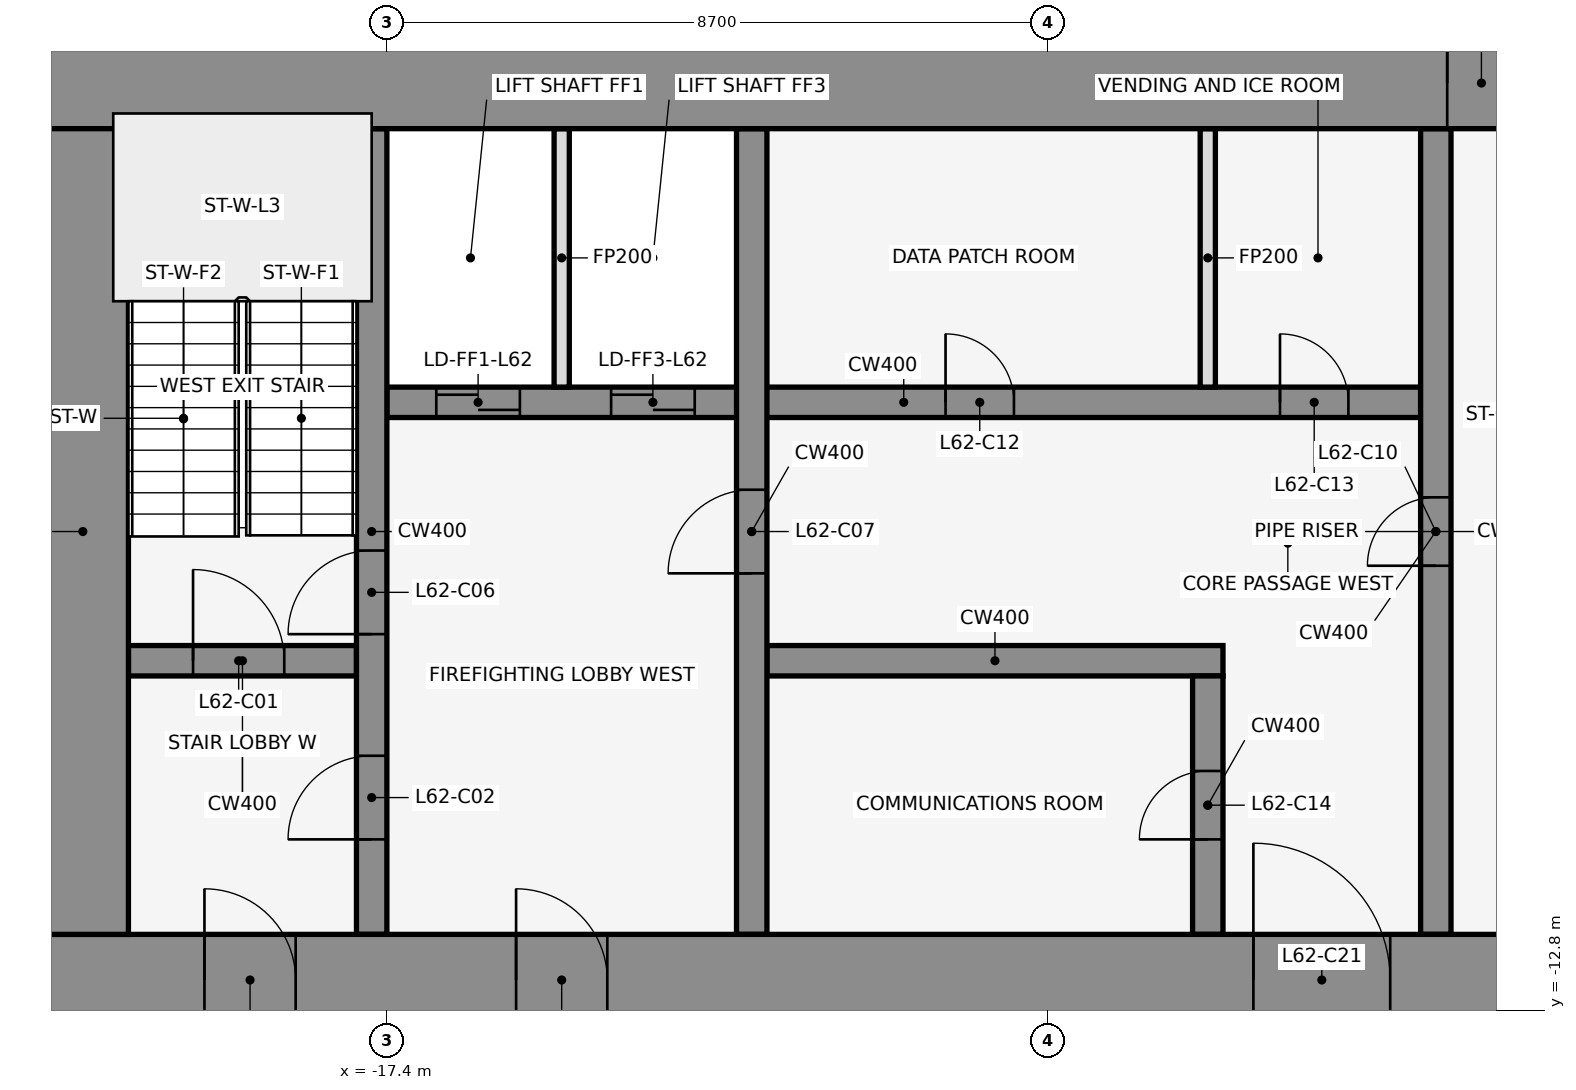
"""IFC4 building model, lengths in metres.
Left out: names, types, materials, properties, quantities, classifications, styles, units other than length and angle.
Written with IfcOpenShell. Run it as: python <this file> out.ifc"""

import sys

from ifc_helpers import new_model, si_unit, direction, frame, frame_2d, origin, place, context, subcontext, project, spatial, rectangle, extrude, element, fill, save


model = new_model("IFC4")
c1 = context("Model", 3, precision=1e-05, world=origin(), true_north=direction((0.0, 1.0)))
c2 = subcontext(c1, "Body", "Model", "MODEL_VIEW")
j1 = project(units=[si_unit("LENGTHUNIT", "METRE"), si_unit("PLANEANGLEUNIT", "RADIAN")], contexts=[c1])
p1 = place(None, origin())
s1 = spatial("IfcSite", under=j1, at=p1, CompositionType="ELEMENT")
p2 = place(p1, origin())
s2 = spatial("IfcBuilding", under=s1, at=p2, CompositionType="ELEMENT")
p3 = place(p2, frame((0.0, 0.0, 275.0)))
s3 = spatial("IfcBuildingStorey", under=s2, at=p3, CompositionType="ELEMENT", Elevation=275.0)
p4 = place(p3, frame((-14.599, 1.08, 0.0), z_axis=(0.0, 0.0, 1.0), x_axis=(-0.83981312244, -0.542875602121, 0.0)))
e1 = element("IfcWall", 1, at=p4, inside=s3, PredefinedType="STANDARD", context=c2, shape_type="SweptSolid", body=[
    extrude(rectangle(XDim=2.183, YDim=0.25, at=frame_2d((1.091, 0.0))), origin(), (0.0, 0.0, 1.0), 4.05),
])
p5 = place(p3, frame((-20.8, -8.2, 0.0), z_axis=(0.0, 0.0, 1.0), x_axis=(1.0, 0.0, 0.0)))
e2 = element("IfcWall", 2, at=p5, inside=s3, PredefinedType="SHEAR", context=c2, shape_type="SweptSolid", body=[
    extrude(rectangle(XDim=3.0, YDim=0.4, at=frame_2d((1.5, 0.0))), origin(), (0.0, 0.0, 1.0), 4.2),
])
p6 = place(p5, frame((0.85, 0.0, 0.0)))
e3 = element("IfcOpeningElement", 3, at=p6, cuts=e2, PredefinedType="OPENING", context=c2, shape_type="SweptSolid", body=[
    extrude(rectangle(XDim=1.2, YDim=2.1, at=frame_2d((0.6, 1.05))), frame((0.0, 0.212, 0.0), z_axis=(0.0, -1.0, 0.0), x_axis=(1.0, 0.0, 0.0)), (0.0, 0.0, 1.0), 0.424),
])
p7 = place(p3, frame((-12.4, -8.2, 0.0), z_axis=(0.0, 0.0, 1.0), x_axis=(1.0, 0.0, 0.0)))
e4 = element("IfcWall", 4, at=p7, inside=s3, PredefinedType="SHEAR", context=c2, shape_type="SweptSolid", body=[
    extrude(rectangle(XDim=6.0, YDim=0.4, at=frame_2d((3.0, 0.0))), origin(), (0.0, 0.0, 1.0), 4.2),
])
p8 = place(p3, frame((-17.4, -4.8, 0.0), z_axis=(0.0, 0.0, 1.0), x_axis=(1.0, 0.0, 0.0)))
e5 = element("IfcWall", 5, at=p8, inside=s3, PredefinedType="SHEAR", context=c2, shape_type="SweptSolid", body=[
    extrude(rectangle(XDim=13.6, YDim=0.4, at=frame_2d((6.8, 0.0))), origin(), (0.0, 0.0, 1.0), 4.2),
])
p9 = place(p8, frame((0.65, 0.0, 0.0)))
e6 = element("IfcOpeningElement", 6, at=p9, cuts=e5, PredefinedType="OPENING", context=c2, shape_type="SweptSolid", body=[
    extrude(rectangle(XDim=1.1, YDim=2.1, at=frame_2d((0.55, 1.05))), frame((0.0, 0.212, 0.0), z_axis=(0.0, -1.0, 0.0), x_axis=(1.0, 0.0, 0.0)), (0.0, 0.0, 1.0), 0.424),
])
p10 = place(p8, frame((2.95, 0.0, 0.0)))
e7 = element("IfcOpeningElement", 7, at=p10, cuts=e5, PredefinedType="OPENING", context=c2, shape_type="SweptSolid", body=[
    extrude(rectangle(XDim=1.1, YDim=2.1, at=frame_2d((0.55, 1.05))), frame((0.0, 0.212, 0.0), z_axis=(0.0, -1.0, 0.0), x_axis=(1.0, 0.0, 0.0)), (0.0, 0.0, 1.0), 0.424),
])
p11 = place(p8, frame((7.35, 0.0, 0.0)))
e8 = element("IfcOpeningElement", 8, at=p11, cuts=e5, PredefinedType="OPENING", context=c2, shape_type="SweptSolid", body=[
    extrude(rectangle(XDim=0.9, YDim=2.1, at=frame_2d((0.45, 1.05))), frame((0.0, 0.212, 0.0), z_axis=(0.0, -1.0, 0.0), x_axis=(1.0, 0.0, 0.0)), (0.0, 0.0, 1.0), 0.424),
])
p12 = place(p8, frame((11.75, 0.0, 0.0)))
e9 = element("IfcOpeningElement", 9, at=p12, cuts=e5, PredefinedType="OPENING", context=c2, shape_type="SweptSolid", body=[
    extrude(rectangle(XDim=0.9, YDim=2.1, at=frame_2d((0.45, 1.05))), frame((0.0, 0.212, 0.0), z_axis=(0.0, -1.0, 0.0), x_axis=(1.0, 0.0, 0.0)), (0.0, 0.0, 1.0), 0.424),
])
p13 = place(p3, frame((-17.6, -11.8, 0.0), z_axis=(0.0, 0.0, 1.0), x_axis=(0.0, 1.0, 0.0)))
e10 = element("IfcWall", 10, at=p13, inside=s3, PredefinedType="SHEAR", context=c2, shape_type="SweptSolid", body=[
    extrude(rectangle(XDim=10.6, YDim=0.4, at=frame_2d((5.3, 0.0))), origin(), (0.0, 0.0, 1.0), 4.2),
])
p14 = place(p13, frame((1.25, 0.0, 0.0)))
e11 = element("IfcOpeningElement", 11, at=p14, cuts=e10, PredefinedType="OPENING", context=c2, shape_type="SweptSolid", body=[
    extrude(rectangle(XDim=1.1, YDim=2.1, at=frame_2d((0.55, 1.05))), frame((0.0, 0.212, 0.0), z_axis=(0.0, -1.0, 0.0), x_axis=(1.0, 0.0, 0.0)), (0.0, 0.0, 1.0), 0.424),
])
p15 = place(p13, frame((3.95, 0.0, 0.0)))
e12 = element("IfcOpeningElement", 12, at=p15, cuts=e10, PredefinedType="OPENING", context=c2, shape_type="SweptSolid", body=[
    extrude(rectangle(XDim=1.1, YDim=2.1, at=frame_2d((0.55, 1.05))), frame((0.0, 0.212, 0.0), z_axis=(0.0, -1.0, 0.0), x_axis=(1.0, 0.0, 0.0)), (0.0, 0.0, 1.0), 0.424),
])
p16 = place(p3, frame((-15.1, -4.6, 0.0), z_axis=(0.0, 0.0, 1.0), x_axis=(0.0, 1.0, 0.0)))
e13 = element("IfcWall", 13, at=p16, inside=s3, PredefinedType="PARTITIONING", context=c2, shape_type="SweptSolid", body=[
    extrude(rectangle(XDim=3.4, YDim=0.2, at=frame_2d((1.7, 0.0))), origin(), (0.0, 0.0, 1.0), 3.118),
])
p17 = place(p3, frame((-12.6, -11.8, 0.0), z_axis=(0.0, 0.0, 1.0), x_axis=(0.0, 1.0, 0.0)))
e14 = element("IfcWall", 14, at=p17, inside=s3, PredefinedType="SHEAR", context=c2, shape_type="SweptSolid", body=[
    extrude(rectangle(XDim=10.6, YDim=0.4, at=frame_2d((5.3, 0.0))), origin(), (0.0, 0.0, 1.0), 4.2),
])
p18 = place(p17, frame((4.75, 0.0, 0.0)))
e15 = element("IfcOpeningElement", 15, at=p18, cuts=e14, PredefinedType="OPENING", context=c2, shape_type="SweptSolid", body=[
    extrude(rectangle(XDim=1.1, YDim=2.1, at=frame_2d((0.55, 1.05))), frame((0.0, 0.212, 0.0), z_axis=(0.0, -1.0, 0.0), x_axis=(1.0, 0.0, 0.0)), (0.0, 0.0, 1.0), 0.424),
])
p19 = place(p3, frame((-6.6, -11.8, 0.0), z_axis=(0.0, 0.0, 1.0), x_axis=(0.0, 1.0, 0.0)))
e16 = element("IfcWall", 16, at=p19, inside=s3, PredefinedType="SHEAR", context=c2, shape_type="SweptSolid", body=[
    extrude(rectangle(XDim=3.4, YDim=0.4, at=frame_2d((1.7, 0.0))), origin(), (0.0, 0.0, 1.0), 4.2),
])
p20 = place(p19, frame((1.25, 0.0, 0.0)))
e17 = element("IfcOpeningElement", 17, at=p20, cuts=e16, PredefinedType="OPENING", context=c2, shape_type="SweptSolid", body=[
    extrude(rectangle(XDim=0.9, YDim=2.1, at=frame_2d((0.45, 1.05))), frame((0.0, 0.212, 0.0), z_axis=(0.0, -1.0, 0.0), x_axis=(1.0, 0.0, 0.0)), (0.0, 0.0, 1.0), 0.424),
])
p21 = place(p3, frame((-6.6, -4.6, 0.0), z_axis=(0.0, 0.0, 1.0), x_axis=(0.0, 1.0, 0.0)))
e18 = element("IfcWall", 18, at=p21, inside=s3, PredefinedType="PARTITIONING", context=c2, shape_type="SweptSolid", body=[
    extrude(rectangle(XDim=3.4, YDim=0.2, at=frame_2d((1.7, 0.0))), origin(), (0.0, 0.0, 1.0), 3.118),
])
p22 = place(p3, frame((-3.6, -11.8, 0.0), z_axis=(0.0, 0.0, 1.0), x_axis=(0.0, 1.0, 0.0)))
e19 = element("IfcWall", 19, at=p22, inside=s3, PredefinedType="SHEAR", context=c2, shape_type="SweptSolid", body=[
    extrude(rectangle(XDim=10.6, YDim=0.4, at=frame_2d((5.3, 0.0))), origin(), (0.0, 0.0, 1.0), 4.2),
])
p23 = place(p22, frame((4.85, 0.0, 0.0)))
e20 = element("IfcOpeningElement", 20, at=p23, cuts=e19, PredefinedType="OPENING", context=c2, shape_type="SweptSolid", body=[
    extrude(rectangle(XDim=0.9, YDim=2.1, at=frame_2d((0.45, 1.05))), frame((0.0, 0.212, 0.0), z_axis=(0.0, -1.0, 0.0), x_axis=(1.0, 0.0, 0.0)), (0.0, 0.0, 1.0), 0.424),
])
p24 = place(p3, frame((-22.0, -0.6, 0.0), z_axis=(0.0, 0.0, 1.0), x_axis=(1.0, 0.0, 0.0)))
e21 = element("IfcWall", 21, at=p24, inside=s3, PredefinedType="SHEAR", context=c2, shape_type="SweptSolid", body=[
    extrude(rectangle(XDim=44.0, YDim=1.2, at=frame_2d((22.0, 0.0))), origin(), (0.0, 0.0, 1.0), 4.2),
])
p25 = place(p24, frame((18.55, 0.0, 0.0)))
e22 = element("IfcOpeningElement", 22, at=p25, cuts=e21, PredefinedType="OPENING", context=c2, shape_type="SweptSolid", body=[
    extrude(rectangle(XDim=0.9, YDim=2.1, at=frame_2d((0.45, 1.05))), frame((0.0, 0.612, 0.0), z_axis=(0.0, -1.0, 0.0), x_axis=(1.0, 0.0, 0.0)), (0.0, 0.0, 1.0), 1.224),
])
p26 = place(p24, frame((24.55, 0.0, 0.0)))
e23 = element("IfcOpeningElement", 23, at=p26, cuts=e21, PredefinedType="OPENING", context=c2, shape_type="SweptSolid", body=[
    extrude(rectangle(XDim=0.9, YDim=2.1, at=frame_2d((0.45, 1.05))), frame((0.0, 0.612, 0.0), z_axis=(0.0, -1.0, 0.0), x_axis=(1.0, 0.0, 0.0)), (0.0, 0.0, 1.0), 1.224),
])
p27 = place(p3, frame((-22.0, -12.4, 0.0), z_axis=(0.0, 0.0, 1.0), x_axis=(1.0, 0.0, 0.0)))
e24 = element("IfcWall", 24, at=p27, inside=s3, PredefinedType="SHEAR", context=c2, shape_type="SweptSolid", body=[
    extrude(rectangle(XDim=44.0, YDim=1.2, at=frame_2d((22.0, 0.0))), origin(), (0.0, 0.0, 1.0), 4.2),
])
p28 = place(p27, frame((2.2, 0.0, 0.0)))
e25 = element("IfcOpeningElement", 25, at=p28, cuts=e24, PredefinedType="OPENING", context=c2, shape_type="SweptSolid", body=[
    extrude(rectangle(XDim=1.2, YDim=2.1, at=frame_2d((0.6, 1.05))), frame((0.0, 0.612, 0.0), z_axis=(0.0, -1.0, 0.0), x_axis=(1.0, 0.0, 0.0)), (0.0, 0.0, 1.0), 1.224),
])
p29 = place(p27, frame((21.4, 0.0, 0.0)))
e26 = element("IfcOpeningElement", 26, at=p29, cuts=e24, PredefinedType="OPENING", context=c2, shape_type="SweptSolid", body=[
    extrude(rectangle(XDim=1.2, YDim=2.1, at=frame_2d((0.6, 1.05))), frame((0.0, 0.612, 0.0), z_axis=(0.0, -1.0, 0.0), x_axis=(1.0, 0.0, 0.0)), (0.0, 0.0, 1.0), 1.224),
])
p30 = place(p27, frame((40.6, 0.0, 0.0)))
e27 = element("IfcOpeningElement", 27, at=p30, cuts=e24, PredefinedType="OPENING", context=c2, shape_type="SweptSolid", body=[
    extrude(rectangle(XDim=1.2, YDim=2.1, at=frame_2d((0.6, 1.05))), frame((0.0, 0.612, 0.0), z_axis=(0.0, -1.0, 0.0), x_axis=(1.0, 0.0, 0.0)), (0.0, 0.0, 1.0), 1.224),
])
p31 = place(p27, frame((16.0, 0.0, 0.0)))
e28 = element("IfcOpeningElement", 28, at=p31, cuts=e24, PredefinedType="OPENING", context=c2, shape_type="SweptSolid", body=[
    extrude(rectangle(XDim=1.8, YDim=2.1, at=frame_2d((0.9, 1.05))), frame((0.0, 0.612, 0.0), z_axis=(0.0, -1.0, 0.0), x_axis=(1.0, 0.0, 0.0)), (0.0, 0.0, 1.0), 1.224),
])
p32 = place(p27, frame((6.3, 0.0, 0.0)))
e29 = element("IfcOpeningElement", 29, at=p32, cuts=e24, PredefinedType="OPENING", context=c2, shape_type="SweptSolid", body=[
    extrude(rectangle(XDim=1.2, YDim=2.1, at=frame_2d((0.6, 1.05))), frame((0.0, 0.612, 0.0), z_axis=(0.0, -1.0, 0.0), x_axis=(1.0, 0.0, 0.0)), (0.0, 0.0, 1.0), 1.224),
])
p33 = place(p27, frame((26.2, 0.0, 0.0)))
e30 = element("IfcOpeningElement", 30, at=p33, cuts=e24, PredefinedType="OPENING", context=c2, shape_type="SweptSolid", body=[
    extrude(rectangle(XDim=1.8, YDim=2.1, at=frame_2d((0.9, 1.05))), frame((0.0, 0.612, 0.0), z_axis=(0.0, -1.0, 0.0), x_axis=(1.0, 0.0, 0.0)), (0.0, 0.0, 1.0), 1.224),
])
p34 = place(p27, frame((36.5, 0.0, 0.0)))
e31 = element("IfcOpeningElement", 31, at=p34, cuts=e24, PredefinedType="OPENING", context=c2, shape_type="SweptSolid", body=[
    extrude(rectangle(XDim=1.2, YDim=2.1, at=frame_2d((0.6, 1.05))), frame((0.0, 0.612, 0.0), z_axis=(0.0, -1.0, 0.0), x_axis=(1.0, 0.0, 0.0)), (0.0, 0.0, 1.0), 1.224),
])
p35 = place(p3, frame((-21.4, -11.8, 0.0), z_axis=(0.0, 0.0, 1.0), x_axis=(0.0, 1.0, 0.0)))
e32 = element("IfcWall", 32, at=p35, inside=s3, PredefinedType="SHEAR", context=c2, shape_type="SweptSolid", body=[
    extrude(rectangle(XDim=10.6, YDim=1.2, at=frame_2d((5.3, 0.0))), origin(), (0.0, 0.0, 1.0), 4.2),
])
p36 = place(p6, origin())
e33 = element("IfcDoor", 33, at=p36, inside=s3, OperationType="SINGLE_SWING_LEFT", PredefinedType="DOOR", context=c2, shape_type="SweptSolid", body=[
    extrude(rectangle(XDim=1.2, YDim=2.1, at=frame_2d((0.6, 1.05))), frame((0.0, 0.025, 0.0), z_axis=(0.0, -1.0, 0.0), x_axis=(1.0, 0.0, 0.0)), (0.0, 0.0, 1.0), 0.05),
])
fill(e3, e33)
p37 = place(p14, frame((1.1, 0.0, 0.0), z_axis=(0.0, 0.0, 1.0), x_axis=(-1.0, 0.0, 0.0)))
e34 = element("IfcDoor", 34, at=p37, inside=s3, OperationType="SINGLE_SWING_LEFT", PredefinedType="DOOR", context=c2, shape_type="SweptSolid", body=[
    extrude(rectangle(XDim=1.1, YDim=2.1, at=frame_2d((0.55, 1.05))), frame((0.0, 0.025, 0.0), z_axis=(0.0, -1.0, 0.0), x_axis=(1.0, 0.0, 0.0)), (0.0, 0.0, 1.0), 0.05),
])
fill(e11, e34)
p38 = place(p9, origin())
e35 = element("IfcDoor", 35, at=p38, inside=s3, OperationType="DOUBLE_DOOR_SLIDING", PredefinedType="DOOR", context=c2, shape_type="SweptSolid", body=[
    extrude(rectangle(XDim=1.1, YDim=2.1, at=frame_2d((0.55, 1.05))), frame((0.0, 0.025, 0.0), z_axis=(0.0, -1.0, 0.0), x_axis=(1.0, 0.0, 0.0)), (0.0, 0.0, 1.0), 0.05),
])
fill(e6, e35)
p39 = place(p10, origin())
e36 = element("IfcDoor", 36, at=p39, inside=s3, OperationType="DOUBLE_DOOR_SLIDING", PredefinedType="DOOR", context=c2, shape_type="SweptSolid", body=[
    extrude(rectangle(XDim=1.1, YDim=2.1, at=frame_2d((0.55, 1.05))), frame((0.0, 0.025, 0.0), z_axis=(0.0, -1.0, 0.0), x_axis=(1.0, 0.0, 0.0)), (0.0, 0.0, 1.0), 0.05),
])
fill(e7, e36)
p40 = place(p15, frame((1.1, 0.0, 0.0), z_axis=(0.0, 0.0, 1.0), x_axis=(-1.0, 0.0, 0.0)))
e37 = element("IfcDoor", 37, at=p40, inside=s3, OperationType="SINGLE_SWING_LEFT", PredefinedType="DOOR", context=c2, shape_type="SweptSolid", body=[
    extrude(rectangle(XDim=1.1, YDim=2.1, at=frame_2d((0.55, 1.05))), frame((0.0, 0.025, 0.0), z_axis=(0.0, -1.0, 0.0), x_axis=(1.0, 0.0, 0.0)), (0.0, 0.0, 1.0), 0.05),
])
fill(e12, e37)
p41 = place(p18, origin())
e38 = element("IfcDoor", 38, at=p41, inside=s3, OperationType="SINGLE_SWING_LEFT", PredefinedType="DOOR", context=c2, shape_type="SweptSolid", body=[
    extrude(rectangle(XDim=1.1, YDim=2.1, at=frame_2d((0.55, 1.05))), frame((0.0, 0.025, 0.0), z_axis=(0.0, -1.0, 0.0), x_axis=(1.0, 0.0, 0.0)), (0.0, 0.0, 1.0), 0.05),
])
fill(e15, e38)
p42 = place(p23, frame((0.9, 0.0, 0.0), z_axis=(0.0, 0.0, 1.0), x_axis=(-1.0, 0.0, 0.0)))
e39 = element("IfcDoor", 39, at=p42, inside=s3, OperationType="SINGLE_SWING_LEFT", PredefinedType="DOOR", context=c2, shape_type="SweptSolid", body=[
    extrude(rectangle(XDim=0.9, YDim=2.1, at=frame_2d((0.45, 1.05))), frame((0.0, 0.025, 0.0), z_axis=(0.0, -1.0, 0.0), x_axis=(1.0, 0.0, 0.0)), (0.0, 0.0, 1.0), 0.05),
])
fill(e20, e39)
p43 = place(p11, origin())
e40 = element("IfcDoor", 40, at=p43, inside=s3, OperationType="SINGLE_SWING_RIGHT", PredefinedType="DOOR", context=c2, shape_type="SweptSolid", body=[
    extrude(rectangle(XDim=0.9, YDim=2.1, at=frame_2d((0.45, 1.05))), frame((0.0, 0.025, 0.0), z_axis=(0.0, -1.0, 0.0), x_axis=(1.0, 0.0, 0.0)), (0.0, 0.0, 1.0), 0.05),
])
fill(e8, e40)
p44 = place(p12, origin())
e41 = element("IfcDoor", 41, at=p44, inside=s3, OperationType="SINGLE_SWING_LEFT", PredefinedType="DOOR", context=c2, shape_type="SweptSolid", body=[
    extrude(rectangle(XDim=0.9, YDim=2.1, at=frame_2d((0.45, 1.05))), frame((0.0, 0.025, 0.0), z_axis=(0.0, -1.0, 0.0), x_axis=(1.0, 0.0, 0.0)), (0.0, 0.0, 1.0), 0.05),
])
fill(e9, e41)
p45 = place(p20, origin())
e42 = element("IfcDoor", 42, at=p45, inside=s3, OperationType="SINGLE_SWING_RIGHT", PredefinedType="DOOR", context=c2, shape_type="SweptSolid", body=[
    extrude(rectangle(XDim=0.9, YDim=2.1, at=frame_2d((0.45, 1.05))), frame((0.0, 0.025, 0.0), z_axis=(0.0, -1.0, 0.0), x_axis=(1.0, 0.0, 0.0)), (0.0, 0.0, 1.0), 0.05),
])
fill(e17, e42)
p46 = place(p25, origin())
e43 = element("IfcDoor", 43, at=p46, inside=s3, OperationType="SINGLE_SWING_LEFT", PredefinedType="DOOR", context=c2, shape_type="SweptSolid", body=[
    extrude(rectangle(XDim=0.9, YDim=2.1, at=frame_2d((0.45, 1.05))), frame((0.0, 0.025, 0.0), z_axis=(0.0, -1.0, 0.0), x_axis=(1.0, 0.0, 0.0)), (0.0, 0.0, 1.0), 0.05),
])
fill(e22, e43)
p47 = place(p28, frame((1.2, 0.0, 0.0), z_axis=(0.0, 0.0, 1.0), x_axis=(-1.0, 0.0, 0.0)))
e44 = element("IfcDoor", 44, at=p47, inside=s3, OperationType="SINGLE_SWING_RIGHT", PredefinedType="DOOR", context=c2, shape_type="SweptSolid", body=[
    extrude(rectangle(XDim=1.2, YDim=2.1, at=frame_2d((0.6, 1.05))), frame((0.0, 0.025, 0.0), z_axis=(0.0, -1.0, 0.0), x_axis=(1.0, 0.0, 0.0)), (0.0, 0.0, 1.0), 0.05),
])
fill(e25, e44)
p48 = place(p31, origin())
e45 = element("IfcDoor", 45, at=p48, inside=s3, OperationType="SINGLE_SWING_LEFT", PredefinedType="DOOR", context=c2, shape_type="SweptSolid", body=[
    extrude(rectangle(XDim=1.8, YDim=2.1, at=frame_2d((0.9, 1.05))), frame((0.0, 0.025, 0.0), z_axis=(0.0, -1.0, 0.0), x_axis=(1.0, 0.0, 0.0)), (0.0, 0.0, 1.0), 0.05),
])
fill(e28, e45)
p49 = place(p32, frame((1.2, 0.0, 0.0), z_axis=(0.0, 0.0, 1.0), x_axis=(-1.0, 0.0, 0.0)))
e46 = element("IfcDoor", 46, at=p49, inside=s3, OperationType="SINGLE_SWING_RIGHT", PredefinedType="DOOR", context=c2, shape_type="SweptSolid", body=[
    extrude(rectangle(XDim=1.2, YDim=2.1, at=frame_2d((0.6, 1.05))), frame((0.0, 0.025, 0.0), z_axis=(0.0, -1.0, 0.0), x_axis=(1.0, 0.0, 0.0)), (0.0, 0.0, 1.0), 0.05),
])
fill(e29, e46)
save(model, sys.argv[1])
